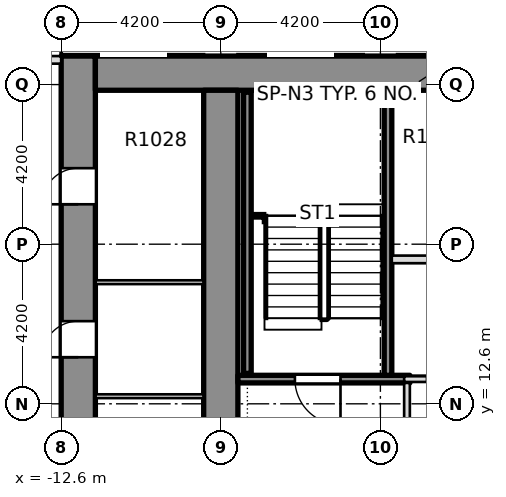
"""IFC4 building model, lengths in metres.
Left out: names, types, materials, properties, quantities, classifications, styles, units other than length and angle.
Written with IfcOpenShell. Run it as: python <this file> out.ifc"""

import sys

from ifc_helpers import new_model, si_unit, direction, frame, frame_2d, origin, place, context, subcontext, project, spatial, rectangle, extrude, element, fill, save


model = new_model("IFC4")
c1 = context("Model", 3, precision=1e-05, world=origin(), true_north=direction((0.0, 1.0)))
c2 = subcontext(c1, "Body", "Model", "MODEL_VIEW")
j1 = project(units=[si_unit("LENGTHUNIT", "METRE"), si_unit("PLANEANGLEUNIT", "RADIAN")], contexts=[c1])
p1 = place(None, origin())
s1 = spatial("IfcSite", under=j1, at=p1, CompositionType="ELEMENT")
p2 = place(p1, origin())
s2 = spatial("IfcBuilding", under=s1, at=p2, CompositionType="ELEMENT")
p3 = place(p2, frame((0.0, 0.0, 48.3)))
s3 = spatial("IfcBuildingStorey", under=s2, at=p3, CompositionType="ELEMENT", Elevation=48.3)
p4 = place(p3, frame((-12.15, -8.4, -0.32), z_axis=(0.0, 0.0, 1.0), x_axis=(0.0, 1.0, 0.0)))
e1 = element("IfcWall", 1, at=p4, inside=s3, PredefinedType="SHEAR", context=c2, shape_type="SweptSolid", body=[
    extrude(rectangle(XDim=30.15, YDim=0.9, at=frame_2d((15.075, 0.0))), origin(), (0.0, 0.0, 1.0), 3.45),
])
p5 = place(p4, frame((3.925, 0.0, 0.32)))
e2 = element("IfcOpeningElement", 2, at=p5, cuts=e1, PredefinedType="OPENING", context=c2, shape_type="SweptSolid", body=[
    extrude(rectangle(XDim=0.95, YDim=2.1, at=frame_2d((0.475, 1.05))), frame((0.0, 0.46, 0.0), z_axis=(0.0, -1.0, 0.0), x_axis=(1.0, 0.0, 0.0)), (0.0, 0.0, 1.0), 0.92),
])
p6 = place(p4, frame((9.175, 0.0, 0.32)))
e3 = element("IfcOpeningElement", 3, at=p6, cuts=e1, PredefinedType="OPENING", context=c2, shape_type="SweptSolid", body=[
    extrude(rectangle(XDim=0.95, YDim=2.1, at=frame_2d((0.475, 1.05))), frame((0.0, 0.46, 0.0), z_axis=(0.0, -1.0, 0.0), x_axis=(1.0, 0.0, 0.0)), (0.0, 0.0, 1.0), 0.92),
])
p7 = place(p4, frame((14.525, 0.0, 0.32)))
e4 = element("IfcOpeningElement", 4, at=p7, cuts=e1, PredefinedType="OPENING", context=c2, shape_type="SweptSolid", body=[
    extrude(rectangle(XDim=0.95, YDim=2.1, at=frame_2d((0.475, 1.05))), frame((0.0, 0.46, 0.0), z_axis=(0.0, -1.0, 0.0), x_axis=(1.0, 0.0, 0.0)), (0.0, 0.0, 1.0), 0.92),
])
p8 = place(p4, frame((22.225, 0.0, 0.32)))
e5 = element("IfcOpeningElement", 5, at=p8, cuts=e1, PredefinedType="OPENING", context=c2, shape_type="SweptSolid", body=[
    extrude(rectangle(XDim=0.95, YDim=2.1, at=frame_2d((0.475, 1.05))), frame((0.0, 0.46, 0.0), z_axis=(0.0, -1.0, 0.0), x_axis=(1.0, 0.0, 0.0)), (0.0, 0.0, 1.0), 0.92),
])
p9 = place(p4, frame((26.25, 0.0, 0.32)))
e6 = element("IfcOpeningElement", 6, at=p9, cuts=e1, PredefinedType="OPENING", context=c2, shape_type="SweptSolid", body=[
    extrude(rectangle(XDim=0.95, YDim=2.1, at=frame_2d((0.475, 1.05))), frame((0.0, 0.46, 0.0), z_axis=(0.0, -1.0, 0.0), x_axis=(1.0, 0.0, 0.0)), (0.0, 0.0, 1.0), 0.92),
])
p10 = place(p4, frame((19.3, 0.0, 0.32)))
e7 = element("IfcOpeningElement", 7, at=p10, cuts=e1, PredefinedType="OPENING", context=c2, shape_type="SweptSolid", body=[
    extrude(rectangle(XDim=1.2, YDim=2.1, at=frame_2d((0.6, 1.05))), frame((0.0, 0.46, 0.0), z_axis=(0.0, -1.0, 0.0), x_axis=(1.0, 0.0, 0.0)), (0.0, 0.0, 1.0), 0.92),
])
p11 = place(p3, frame((-11.7, 21.3, -0.32), z_axis=(0.0, 0.0, 1.0), x_axis=(1.0, 0.0, 0.0)))
e8 = element("IfcWall", 8, at=p11, inside=s3, PredefinedType="SOLIDWALL", context=c2, shape_type="SweptSolid", body=[
    extrude(rectangle(XDim=23.4, YDim=0.9, at=frame_2d((11.7, 0.0))), origin(), (0.0, 0.0, 1.0), 3.45),
])
p12 = place(p3, frame((-8.4, -7.5, -0.32), z_axis=(0.0, 0.0, 1.0), x_axis=(0.0, 1.0, 0.0)))
e9 = element("IfcWall", 9, at=p12, inside=s3, PredefinedType="SHEAR", context=c2, shape_type="SweptSolid", body=[
    extrude(rectangle(XDim=28.35, YDim=0.9, at=frame_2d((14.175, 0.0))), origin(), (0.0, 0.0, 1.0), 3.45),
])
p13 = place(p12, frame((18.4, 0.0, 0.32)))
e10 = element("IfcOpeningElement", 10, at=p13, cuts=e9, PredefinedType="OPENING", context=c2, shape_type="SweptSolid", body=[
    extrude(rectangle(XDim=1.2, YDim=2.1, at=frame_2d((0.6, 1.05))), frame((0.0, 0.46, 0.0), z_axis=(0.0, -1.0, 0.0), x_axis=(1.0, 0.0, 0.0)), (0.0, 0.0, 1.0), 0.92),
])
p14 = place(p3, frame((-12.6, 21.65, 0.0), z_axis=(0.0, 0.0, 1.0), x_axis=(-1.0, 0.0, 0.0)))
e11 = element("IfcWall", 11, at=p14, inside=s3, PredefinedType="STANDARD", context=c2, shape_type="SweptSolid", body=[
    extrude(rectangle(XDim=3.5, YDim=0.2, at=frame_2d((1.75, 0.0))), origin(), (0.0, 0.0, 1.0), 3.13),
])
p15 = place(p14, frame((0.3, 0.0, 0.2)))
e12 = element("IfcOpeningElement", 12, at=p15, cuts=e11, PredefinedType="OPENING", context=c2, shape_type="SweptSolid", body=[
    extrude(rectangle(XDim=1.8, YDim=2.65, at=frame_2d((0.9, 1.325))), frame((0.0, 0.11, 0.0), z_axis=(0.0, -1.0, 0.0), x_axis=(1.0, 0.0, 0.0)), (0.0, 0.0, 1.0), 0.22),
])
p16 = place(p14, frame((2.3, 0.0, 0.0)))
e13 = element("IfcOpeningElement", 13, at=p16, cuts=e11, PredefinedType="OPENING", context=c2, shape_type="SweptSolid", body=[
    extrude(rectangle(XDim=1.0, YDim=2.4, at=frame_2d((0.5, 1.2))), frame((0.0, 0.11, 0.0), z_axis=(0.0, -1.0, 0.0), x_axis=(1.0, 0.0, 0.0)), (0.0, 0.0, 1.0), 0.22),
])
p17 = place(p3, frame((-7.949, 13.25, 0.0), z_axis=(0.0, 0.0, 1.0), x_axis=(1.0, 0.0, 0.0)))
e14 = element("IfcWall", 14, at=p17, inside=s3, PredefinedType="SOLIDWALL", context=c2, shape_type="SweptSolid", body=[
    extrude(rectangle(XDim=4.524, YDim=0.2, at=frame_2d((2.262, 0.0))), origin(), (0.0, 0.0, 1.0), 3.13),
])
p18 = place(p17, frame((1.499, 0.0, 0.0)))
e15 = element("IfcOpeningElement", 15, at=p18, cuts=e14, PredefinedType="OPENING", context=c2, shape_type="SweptSolid", body=[
    extrude(rectangle(XDim=1.2, YDim=2.1, at=frame_2d((0.6, 1.05))), frame((0.0, 0.11, 0.0), z_axis=(0.0, -1.0, 0.0), x_axis=(1.0, 0.0, 0.0)), (0.0, 0.0, 1.0), 0.22),
])
p19 = place(p3, frame((-3.575, 13.25, 0.0), z_axis=(0.0, 0.0, 1.0), x_axis=(1.0, 0.0, 0.0)))
e16 = element("IfcWall", 16, at=p19, inside=s3, PredefinedType="PARTITIONING", context=c2, shape_type="SweptSolid", body=[
    extrude(rectangle(XDim=7.15, YDim=0.15, at=frame_2d((3.575, 0.0))), origin(), (0.0, 0.0, 1.0), 3.13),
])
p20 = place(p19, frame((0.6, 0.0, 0.0)))
e17 = element("IfcOpeningElement", 17, at=p20, cuts=e16, PredefinedType="OPENING", context=c2, shape_type="SweptSolid", body=[
    extrude(rectangle(XDim=1.2, YDim=2.1, at=frame_2d((0.6, 1.05))), frame((0.0, 0.085, 0.0), z_axis=(0.0, -1.0, 0.0), x_axis=(1.0, 0.0, 0.0)), (0.0, 0.0, 1.0), 0.17),
])
p21 = place(p19, frame((5.4, 0.0, 0.0)))
e18 = element("IfcOpeningElement", 18, at=p21, cuts=e16, PredefinedType="OPENING", context=c2, shape_type="SweptSolid", body=[
    extrude(rectangle(XDim=1.1, YDim=2.1, at=frame_2d((0.55, 1.05))), frame((0.0, 0.085, 0.0), z_axis=(0.0, -1.0, 0.0), x_axis=(1.0, 0.0, 0.0)), (0.0, 0.0, 1.0), 0.17),
])
p22 = place(p19, frame((2.975, 0.0, 0.0)))
e19 = element("IfcOpeningElement", 19, at=p22, cuts=e16, PredefinedType="OPENING", context=c2, shape_type="SweptSolid", body=[
    extrude(rectangle(XDim=1.2, YDim=2.1, at=frame_2d((0.6, 1.05))), frame((0.0, 0.085, 0.0), z_axis=(0.0, -1.0, 0.0), x_axis=(1.0, 0.0, 0.0)), (0.0, 0.0, 1.0), 0.17),
])
p23 = place(p3, frame((-3.9, 16.4, 0.0), z_axis=(0.0, 0.0, 1.0), x_axis=(1.0, 0.0, 0.0)))
e20 = element("IfcWall", 20, at=p23, inside=s3, PredefinedType="PARTITIONING", context=c2, shape_type="SweptSolid", body=[
    extrude(rectangle(XDim=3.05, YDim=0.2, at=frame_2d((1.525, 0.0))), origin(), (0.0, 0.0, 1.0), 3.13),
])
p24 = place(p3, frame((-4.0, 13.35, 0.0), z_axis=(0.0, 0.0, 1.0), x_axis=(0.0, 1.0, 0.0)))
e21 = element("IfcWall", 21, at=p24, inside=s3, PredefinedType="SOLIDWALL", context=c2, shape_type="SweptSolid", body=[
    extrude(rectangle(XDim=7.499, YDim=0.2, at=frame_2d((3.75, 0.0))), origin(), (0.0, 0.0, 1.0), 3.13),
])
p25 = place(p3, frame((-3.5, 10.075, 0.0), z_axis=(0.0, 0.0, 1.0), x_axis=(0.0, 1.0, 0.0)))
e22 = element("IfcWall", 22, at=p25, inside=s3, PredefinedType="PARTITIONING", context=c2, shape_type="SweptSolid", body=[
    extrude(rectangle(XDim=3.075, YDim=0.15, at=frame_2d((1.538, 0.0))), origin(), (0.0, 0.0, 1.0), 3.13),
])
p26 = place(p25, frame((0.925, 0.0, 0.0)))
e23 = element("IfcOpeningElement", 23, at=p26, cuts=e22, PredefinedType="OPENING", context=c2, shape_type="SweptSolid", body=[
    extrude(rectangle(XDim=1.2, YDim=2.1, at=frame_2d((0.6, 1.05))), frame((0.0, 0.085, 0.0), z_axis=(0.0, -1.0, 0.0), x_axis=(1.0, 0.0, 0.0)), (0.0, 0.0, 1.0), 0.17),
])
for number, where, z_axis, x_axis in (
    (24, (-11.699, 12.8, 0.0), (0.0, 0.0, 1.0), (1.0, 0.0, 0.0)),
    (25, (-11.699, 15.8, 0.0), (0.0, 0.0, 1.0), (1.0, 0.0, 0.0)),
):
    element("IfcWall", number, at=place(p3, frame(where, z_axis=z_axis, x_axis=x_axis)), inside=s3, PredefinedType="PARTITIONING", context=c2, shape_type="SweptSolid", body=[
        extrude(rectangle(XDim=2.848, YDim=0.1, at=frame_2d((1.424, 0.0))), origin(), (0.0, 0.0, 1.0), 3.13),
    ])
p27 = place(p3, frame((-7.7, 13.4, 0.0), z_axis=(0.0, 0.0, 1.0), x_axis=(0.0, 1.0, 0.0)))
e26 = element("IfcWall", 26, at=p27, inside=s3, PredefinedType="SOLIDWALL", context=c2, shape_type="SweptSolid", body=[
    extrude(rectangle(XDim=7.4, YDim=0.2, at=frame_2d((3.7, 0.0))), origin(), (0.0, 0.0, 1.0), 3.13),
])
p28 = place(p18, origin())
e27 = element("IfcDoor", 27, at=p28, inside=s3, OperationType="SINGLE_SWING_LEFT", PredefinedType="DOOR", context=c2, shape_type="SweptSolid", body=[
    extrude(rectangle(XDim=1.2, YDim=2.1, at=frame_2d((0.6, 1.05))), frame((0.0, 0.025, 0.0), z_axis=(0.0, -1.0, 0.0), x_axis=(1.0, 0.0, 0.0)), (0.0, 0.0, 1.0), 0.05),
])
fill(e15, e27)
p29 = place(p8, origin())
e28 = element("IfcDoor", 28, at=p29, inside=s3, OperationType="SINGLE_SWING_LEFT", PredefinedType="DOOR", context=c2, shape_type="SweptSolid", body=[
    extrude(rectangle(XDim=0.95, YDim=2.1, at=frame_2d((0.475, 1.05))), frame((0.0, 0.025, 0.0), z_axis=(0.0, -1.0, 0.0), x_axis=(1.0, 0.0, 0.0)), (0.0, 0.0, 1.0), 0.05),
])
fill(e5, e28)
p30 = place(p9, origin())
e29 = element("IfcDoor", 29, at=p30, inside=s3, OperationType="SINGLE_SWING_LEFT", PredefinedType="DOOR", context=c2, shape_type="SweptSolid", body=[
    extrude(rectangle(XDim=0.95, YDim=2.1, at=frame_2d((0.475, 1.05))), frame((0.0, 0.025, 0.0), z_axis=(0.0, -1.0, 0.0), x_axis=(1.0, 0.0, 0.0)), (0.0, 0.0, 1.0), 0.05),
])
fill(e6, e29)
save(model, sys.argv[1])
